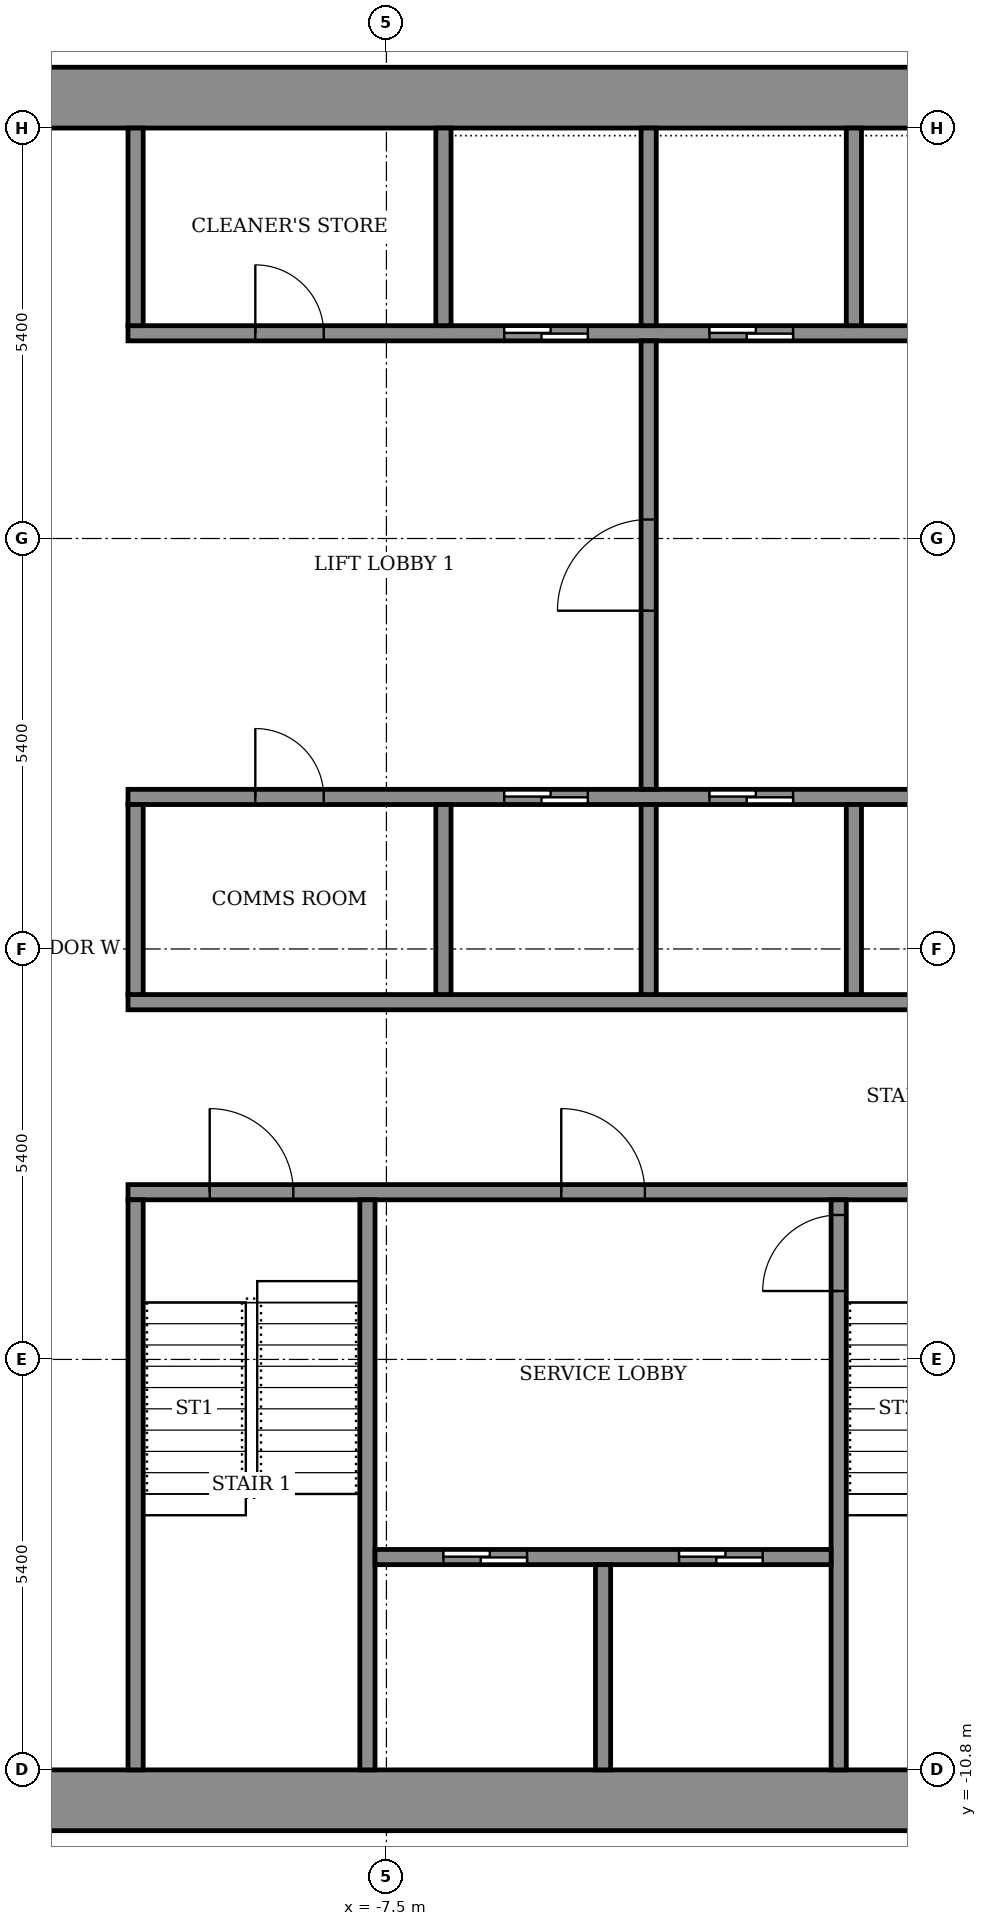
"""IFC4 building model, lengths in metres.
Left out: names, types, materials, properties, quantities, classifications, styles, units other than length and angle.
Written with IfcOpenShell. Run it as: python <this file> out.ifc"""

import sys

from ifc_helpers import new_model, si_unit, direction, frame, frame_2d, origin, place, context, subcontext, project, spatial, rectangle, extrude, element, fill, save


model = new_model("IFC4")
c1 = context("Model", 3, precision=1e-05, world=origin(), true_north=direction((0.0, 1.0)))
c2 = subcontext(c1, "Body", "Model", "MODEL_VIEW")
j1 = project(units=[si_unit("LENGTHUNIT", "METRE"), si_unit("PLANEANGLEUNIT", "RADIAN")], contexts=[c1])
p1 = place(None, origin())
s1 = spatial("IfcSite", under=j1, at=p1, CompositionType="ELEMENT")
p2 = place(p1, origin())
s2 = spatial("IfcBuilding", under=s1, at=p2, CompositionType="ELEMENT")
p3 = place(p2, frame((0.0, 0.0, 238.3)))
s3 = spatial("IfcBuildingStorey", under=s2, at=p3, CompositionType="ELEMENT", Elevation=238.3)
for number, where, z_axis, x_axis in (
    (1, (-14.6, -11.2, 0.0), (0.0, 0.0, 1.0), (1.0, 0.0, 0.0)),
    (2, (-14.6, 11.2, 0.0), (0.0, 0.0, 1.0), (1.0, 0.0, 0.0)),
):
    element("IfcWall", number, at=place(p3, frame(where, z_axis=z_axis, x_axis=x_axis)), inside=s3, PredefinedType="SHEAR", context=c2, shape_type="SweptSolid", body=[
        extrude(rectangle(XDim=29.2, YDim=0.8, at=frame_2d((14.6, 0.0))), origin(), (0.0, 0.0, 1.0), 3.6),
    ])
p4 = place(p3, frame((-10.9, -3.2, 0.0), z_axis=(0.0, 0.0, 1.0), x_axis=(1.0, 0.0, 0.0)))
e3 = element("IfcWall", 3, at=p4, inside=s3, PredefinedType="SHEAR", context=c2, shape_type="SweptSolid", body=[
    extrude(rectangle(XDim=21.8, YDim=0.2, at=frame_2d((10.9, 0.0))), origin(), (0.0, 0.0, 1.0), 3.05),
])
p5 = place(p4, frame((1.075, 0.0, 0.0)))
e4 = element("IfcOpeningElement", 4, at=p5, cuts=e3, PredefinedType="OPENING", context=c2, shape_type="SweptSolid", body=[
    extrude(rectangle(XDim=1.1, YDim=2.1, at=frame_2d((0.55, 1.05))), frame((0.0, 0.11, 0.0), z_axis=(0.0, -1.0, 0.0), x_axis=(1.0, 0.0, 0.0)), (0.0, 0.0, 1.0), 0.22),
])
p6 = place(p4, frame((10.325, 0.0, 0.0)))
e5 = element("IfcOpeningElement", 5, at=p6, cuts=e3, PredefinedType="OPENING", context=c2, shape_type="SweptSolid", body=[
    extrude(rectangle(XDim=1.1, YDim=2.1, at=frame_2d((0.55, 1.05))), frame((0.0, 0.11, 0.0), z_axis=(0.0, -1.0, 0.0), x_axis=(1.0, 0.0, 0.0)), (0.0, 0.0, 1.0), 0.22),
])
p7 = place(p4, frame((19.625, 0.0, 0.0)))
e6 = element("IfcOpeningElement", 6, at=p7, cuts=e3, PredefinedType="OPENING", context=c2, shape_type="SweptSolid", body=[
    extrude(rectangle(XDim=1.1, YDim=2.1, at=frame_2d((0.55, 1.05))), frame((0.0, 0.11, 0.0), z_axis=(0.0, -1.0, 0.0), x_axis=(1.0, 0.0, 0.0)), (0.0, 0.0, 1.0), 0.22),
])
p8 = place(p4, frame((5.7, 0.0, 0.0)))
e7 = element("IfcOpeningElement", 7, at=p8, cuts=e3, PredefinedType="OPENING", context=c2, shape_type="SweptSolid", body=[
    extrude(rectangle(XDim=1.1, YDim=2.1, at=frame_2d((0.55, 1.05))), frame((0.0, 0.11, 0.0), z_axis=(0.0, -1.0, 0.0), x_axis=(1.0, 0.0, 0.0)), (0.0, 0.0, 1.0), 0.22),
])
p9 = place(p4, frame((14.975, 0.0, 0.0)))
e8 = element("IfcOpeningElement", 8, at=p9, cuts=e3, PredefinedType="OPENING", context=c2, shape_type="SweptSolid", body=[
    extrude(rectangle(XDim=1.1, YDim=2.1, at=frame_2d((0.55, 1.05))), frame((0.0, 0.11, 0.0), z_axis=(0.0, -1.0, 0.0), x_axis=(1.0, 0.0, 0.0)), (0.0, 0.0, 1.0), 0.22),
])
p10 = place(p3, frame((-10.9, -0.7, 0.0), z_axis=(0.0, 0.0, 1.0), x_axis=(1.0, 0.0, 0.0)))
e9 = element("IfcWall", 9, at=p10, inside=s3, PredefinedType="SHEAR", context=c2, shape_type="SweptSolid", body=[
    extrude(rectangle(XDim=21.8, YDim=0.2, at=frame_2d((10.9, 0.0))), origin(), (0.0, 0.0, 1.0), 3.05),
])
p11 = place(p3, frame((-10.9, 2.0, 0.0), z_axis=(0.0, 0.0, 1.0), x_axis=(1.0, 0.0, 0.0)))
e10 = element("IfcWall", 10, at=p11, inside=s3, PredefinedType="SHEAR", context=c2, shape_type="SweptSolid", body=[
    extrude(rectangle(XDim=21.8, YDim=0.2, at=frame_2d((10.9, 0.0))), origin(), (0.0, 0.0, 1.0), 3.05),
])
p12 = place(p11, frame((4.95, 0.0, 0.0)))
e11 = element("IfcOpeningElement", 11, at=p12, cuts=e10, PredefinedType="OPENING", context=c2, shape_type="SweptSolid", body=[
    extrude(rectangle(XDim=1.1, YDim=2.1, at=frame_2d((0.55, 1.05))), frame((0.0, 0.11, 0.0), z_axis=(0.0, -1.0, 0.0), x_axis=(1.0, 0.0, 0.0)), (0.0, 0.0, 1.0), 0.22),
])
p13 = place(p11, frame((7.65, 0.0, 0.0)))
e12 = element("IfcOpeningElement", 12, at=p13, cuts=e10, PredefinedType="OPENING", context=c2, shape_type="SweptSolid", body=[
    extrude(rectangle(XDim=1.1, YDim=2.1, at=frame_2d((0.55, 1.05))), frame((0.0, 0.11, 0.0), z_axis=(0.0, -1.0, 0.0), x_axis=(1.0, 0.0, 0.0)), (0.0, 0.0, 1.0), 0.22),
])
p14 = place(p11, frame((10.35, 0.0, 0.0)))
e13 = element("IfcOpeningElement", 13, at=p14, cuts=e10, PredefinedType="OPENING", context=c2, shape_type="SweptSolid", body=[
    extrude(rectangle(XDim=1.1, YDim=2.1, at=frame_2d((0.55, 1.05))), frame((0.0, 0.11, 0.0), z_axis=(0.0, -1.0, 0.0), x_axis=(1.0, 0.0, 0.0)), (0.0, 0.0, 1.0), 0.22),
])
p15 = place(p11, frame((1.675, 0.0, 0.0)))
e14 = element("IfcOpeningElement", 14, at=p15, cuts=e10, PredefinedType="OPENING", context=c2, shape_type="SweptSolid", body=[
    extrude(rectangle(XDim=0.9, YDim=2.1, at=frame_2d((0.45, 1.05))), frame((0.0, 0.11, 0.0), z_axis=(0.0, -1.0, 0.0), x_axis=(1.0, 0.0, 0.0)), (0.0, 0.0, 1.0), 0.22),
])
p16 = place(p11, frame((13.825, 0.0, 0.0)))
e15 = element("IfcOpeningElement", 15, at=p16, cuts=e10, PredefinedType="OPENING", context=c2, shape_type="SweptSolid", body=[
    extrude(rectangle(XDim=0.9, YDim=2.1, at=frame_2d((0.45, 1.05))), frame((0.0, 0.11, 0.0), z_axis=(0.0, -1.0, 0.0), x_axis=(1.0, 0.0, 0.0)), (0.0, 0.0, 1.0), 0.22),
])
p17 = place(p11, frame((18.55, 0.0, 0.0)))
e16 = element("IfcOpeningElement", 16, at=p17, cuts=e10, PredefinedType="OPENING", context=c2, shape_type="SweptSolid", body=[
    extrude(rectangle(XDim=0.9, YDim=2.1, at=frame_2d((0.45, 1.05))), frame((0.0, 0.11, 0.0), z_axis=(0.0, -1.0, 0.0), x_axis=(1.0, 0.0, 0.0)), (0.0, 0.0, 1.0), 0.22),
])
p18 = place(p3, frame((-10.9, 8.1, 0.0), z_axis=(0.0, 0.0, 1.0), x_axis=(1.0, 0.0, 0.0)))
e17 = element("IfcWall", 17, at=p18, inside=s3, PredefinedType="SHEAR", context=c2, shape_type="SweptSolid", body=[
    extrude(rectangle(XDim=21.8, YDim=0.2, at=frame_2d((10.9, 0.0))), origin(), (0.0, 0.0, 1.0), 3.05),
])
p19 = place(p18, frame((4.95, 0.0, 0.0)))
e18 = element("IfcOpeningElement", 18, at=p19, cuts=e17, PredefinedType="OPENING", context=c2, shape_type="SweptSolid", body=[
    extrude(rectangle(XDim=1.1, YDim=2.1, at=frame_2d((0.55, 1.05))), frame((0.0, 0.11, 0.0), z_axis=(0.0, -1.0, 0.0), x_axis=(1.0, 0.0, 0.0)), (0.0, 0.0, 1.0), 0.22),
])
p20 = place(p18, frame((7.65, 0.0, 0.0)))
e19 = element("IfcOpeningElement", 19, at=p20, cuts=e17, PredefinedType="OPENING", context=c2, shape_type="SweptSolid", body=[
    extrude(rectangle(XDim=1.1, YDim=2.1, at=frame_2d((0.55, 1.05))), frame((0.0, 0.11, 0.0), z_axis=(0.0, -1.0, 0.0), x_axis=(1.0, 0.0, 0.0)), (0.0, 0.0, 1.0), 0.22),
])
p21 = place(p18, frame((10.35, 0.0, 0.0)))
e20 = element("IfcOpeningElement", 20, at=p21, cuts=e17, PredefinedType="OPENING", context=c2, shape_type="SweptSolid", body=[
    extrude(rectangle(XDim=1.1, YDim=2.1, at=frame_2d((0.55, 1.05))), frame((0.0, 0.11, 0.0), z_axis=(0.0, -1.0, 0.0), x_axis=(1.0, 0.0, 0.0)), (0.0, 0.0, 1.0), 0.22),
])
p22 = place(p18, frame((1.675, 0.0, 0.0)))
e21 = element("IfcOpeningElement", 21, at=p22, cuts=e17, PredefinedType="OPENING", context=c2, shape_type="SweptSolid", body=[
    extrude(rectangle(XDim=0.9, YDim=2.1, at=frame_2d((0.45, 1.05))), frame((0.0, 0.11, 0.0), z_axis=(0.0, -1.0, 0.0), x_axis=(1.0, 0.0, 0.0)), (0.0, 0.0, 1.0), 0.22),
])
p23 = place(p18, frame((13.825, 0.0, 0.0)))
e22 = element("IfcOpeningElement", 22, at=p23, cuts=e17, PredefinedType="OPENING", context=c2, shape_type="SweptSolid", body=[
    extrude(rectangle(XDim=0.9, YDim=2.1, at=frame_2d((0.45, 1.05))), frame((0.0, 0.11, 0.0), z_axis=(0.0, -1.0, 0.0), x_axis=(1.0, 0.0, 0.0)), (0.0, 0.0, 1.0), 0.22),
])
p24 = place(p18, frame((18.55, 0.0, 0.0)))
e23 = element("IfcOpeningElement", 23, at=p24, cuts=e17, PredefinedType="OPENING", context=c2, shape_type="SweptSolid", body=[
    extrude(rectangle(XDim=0.9, YDim=2.1, at=frame_2d((0.45, 1.05))), frame((0.0, 0.11, 0.0), z_axis=(0.0, -1.0, 0.0), x_axis=(1.0, 0.0, 0.0)), (0.0, 0.0, 1.0), 0.22),
])
for number, where, z_axis, x_axis in (
    (24, (-10.8, -10.8, 0.0), (0.0, 0.0, 1.0), (0.0, 1.0, 0.0)),
    (25, (-7.75, -10.8, 0.0), (0.0, 0.0, 1.0), (0.0, 1.0, 0.0)),
):
    element("IfcWall", number, at=place(p3, frame(where, z_axis=z_axis, x_axis=x_axis)), inside=s3, PredefinedType="SHEAR", context=c2, shape_type="SweptSolid", body=[
        extrude(rectangle(XDim=7.5, YDim=0.2, at=frame_2d((3.75, 0.0))), origin(), (0.0, 0.0, 1.0), 3.05),
    ])
p25 = place(p3, frame((-1.55, -10.8, 0.0), z_axis=(0.0, 0.0, 1.0), x_axis=(0.0, 1.0, 0.0)))
e26 = element("IfcWall", 26, at=p25, inside=s3, PredefinedType="SHEAR", context=c2, shape_type="SweptSolid", body=[
    extrude(rectangle(XDim=7.5, YDim=0.2, at=frame_2d((3.75, 0.0))), origin(), (0.0, 0.0, 1.0), 3.05),
])
p26 = place(p25, frame((6.3, 0.0, 0.0)))
e27 = element("IfcOpeningElement", 27, at=p26, cuts=e26, PredefinedType="OPENING", context=c2, shape_type="SweptSolid", body=[
    extrude(rectangle(XDim=1.0, YDim=2.1, at=frame_2d((0.5, 1.05))), frame((0.0, 0.11, 0.0), z_axis=(0.0, -1.0, 0.0), x_axis=(1.0, 0.0, 0.0)), (0.0, 0.0, 1.0), 0.22),
])
p27 = place(p3, frame((-7.65, -8.0, 0.0), z_axis=(0.0, 0.0, 1.0), x_axis=(1.0, 0.0, 0.0)))
e28 = element("IfcWall", 28, at=p27, inside=s3, PredefinedType="SHEAR", context=c2, shape_type="SweptSolid", body=[
    extrude(rectangle(XDim=6.0, YDim=0.2, at=frame_2d((3.0, 0.0))), origin(), (0.0, 0.0, 1.0), 3.05),
])
p28 = place(p27, frame((0.9, 0.0, 0.0)))
e29 = element("IfcOpeningElement", 29, at=p28, cuts=e28, PredefinedType="OPENING", context=c2, shape_type="SweptSolid", body=[
    extrude(rectangle(XDim=1.1, YDim=2.1, at=frame_2d((0.55, 1.05))), frame((0.0, 0.11, 0.0), z_axis=(0.0, -1.0, 0.0), x_axis=(1.0, 0.0, 0.0)), (0.0, 0.0, 1.0), 0.22),
])
p29 = place(p27, frame((4.0, 0.0, 0.0)))
e30 = element("IfcOpeningElement", 30, at=p29, cuts=e28, PredefinedType="OPENING", context=c2, shape_type="SweptSolid", body=[
    extrude(rectangle(XDim=1.1, YDim=2.1, at=frame_2d((0.55, 1.05))), frame((0.0, 0.11, 0.0), z_axis=(0.0, -1.0, 0.0), x_axis=(1.0, 0.0, 0.0)), (0.0, 0.0, 1.0), 0.22),
])
p30 = place(p3, frame((-4.65, -10.8, 0.0), z_axis=(0.0, 0.0, 1.0), x_axis=(0.0, 1.0, 0.0)))
e31 = element("IfcWall", 31, at=p30, inside=s3, PredefinedType="SHEAR", context=c2, shape_type="SweptSolid", body=[
    extrude(rectangle(XDim=2.7, YDim=0.2, at=frame_2d((1.35, 0.0))), origin(), (0.0, 0.0, 1.0), 3.05),
])
p31 = place(p3, frame((-10.8, -0.6, 0.0), z_axis=(0.0, 0.0, 1.0), x_axis=(0.0, 1.0, 0.0)))
e32 = element("IfcWall", 32, at=p31, inside=s3, PredefinedType="STANDARD", context=c2, shape_type="SweptSolid", body=[
    extrude(rectangle(XDim=2.5, YDim=0.2, at=frame_2d((1.25, 0.0))), origin(), (0.0, 0.0, 1.0), 3.05),
])
for number, where, z_axis, x_axis in (
    (33, (-6.75, -0.6, 0.0), (0.0, 0.0, 1.0), (0.0, 1.0, 0.0)),
    (34, (-4.05, -0.6, 0.0), (0.0, 0.0, 1.0), (0.0, 1.0, 0.0)),
    (35, (-1.35, -0.6, 0.0), (0.0, 0.0, 1.0), (0.0, 1.0, 0.0)),
):
    element("IfcWall", number, at=place(p3, frame(where, z_axis=z_axis, x_axis=x_axis)), inside=s3, PredefinedType="SHEAR", context=c2, shape_type="SweptSolid", body=[
        extrude(rectangle(XDim=2.5, YDim=0.2, at=frame_2d((1.25, 0.0))), origin(), (0.0, 0.0, 1.0), 3.05),
    ])
p32 = place(p3, frame((-10.8, 8.2, 0.0), z_axis=(0.0, 0.0, 1.0), x_axis=(0.0, 1.0, 0.0)))
e36 = element("IfcWall", 36, at=p32, inside=s3, PredefinedType="STANDARD", context=c2, shape_type="SweptSolid", body=[
    extrude(rectangle(XDim=2.6, YDim=0.2, at=frame_2d((1.3, 0.0))), origin(), (0.0, 0.0, 1.0), 3.05),
])
for number, where, z_axis, x_axis in (
    (37, (-6.75, 8.2, 0.0), (0.0, 0.0, 1.0), (0.0, 1.0, 0.0)),
    (38, (-4.05, 8.2, 0.0), (0.0, 0.0, 1.0), (0.0, 1.0, 0.0)),
    (39, (-1.35, 8.2, 0.0), (0.0, 0.0, 1.0), (0.0, 1.0, 0.0)),
):
    element("IfcWall", number, at=place(p3, frame(where, z_axis=z_axis, x_axis=x_axis)), inside=s3, PredefinedType="SHEAR", context=c2, shape_type="SweptSolid", body=[
        extrude(rectangle(XDim=2.6, YDim=0.2, at=frame_2d((1.3, 0.0))), origin(), (0.0, 0.0, 1.0), 3.05),
    ])
p33 = place(p3, frame((-4.05, 2.1, 0.0), z_axis=(0.0, 0.0, 1.0), x_axis=(0.0, 1.0, 0.0)))
e40 = element("IfcWall", 40, at=p33, inside=s3, PredefinedType="STANDARD", context=c2, shape_type="SweptSolid", body=[
    extrude(rectangle(XDim=5.9, YDim=0.2, at=frame_2d((2.95, 0.0))), origin(), (0.0, 0.0, 1.0), 3.05),
])
p34 = place(p33, frame((2.35, 0.0, 0.0)))
e41 = element("IfcOpeningElement", 41, at=p34, cuts=e40, PredefinedType="OPENING", context=c2, shape_type="SweptSolid", body=[
    extrude(rectangle(XDim=1.2, YDim=2.1, at=frame_2d((0.6, 1.05))), frame((0.0, 0.11, 0.0), z_axis=(0.0, -1.0, 0.0), x_axis=(1.0, 0.0, 0.0)), (0.0, 0.0, 1.0), 0.22),
])
p35 = place(p12, origin())
e42 = element("IfcDoor", 42, at=p35, inside=s3, OperationType="SLIDING_TO_LEFT", PredefinedType="DOOR", context=c2, shape_type="SweptSolid", body=[
    extrude(rectangle(XDim=1.1, YDim=2.1, at=frame_2d((0.55, 1.05))), frame((0.0, 0.025, 0.0), z_axis=(0.0, -1.0, 0.0), x_axis=(1.0, 0.0, 0.0)), (0.0, 0.0, 1.0), 0.05),
])
fill(e11, e42)
p36 = place(p13, origin())
e43 = element("IfcDoor", 43, at=p36, inside=s3, OperationType="SLIDING_TO_LEFT", PredefinedType="DOOR", context=c2, shape_type="SweptSolid", body=[
    extrude(rectangle(XDim=1.1, YDim=2.1, at=frame_2d((0.55, 1.05))), frame((0.0, 0.025, 0.0), z_axis=(0.0, -1.0, 0.0), x_axis=(1.0, 0.0, 0.0)), (0.0, 0.0, 1.0), 0.05),
])
fill(e12, e43)
p37 = place(p19, origin())
e44 = element("IfcDoor", 44, at=p37, inside=s3, OperationType="SLIDING_TO_LEFT", PredefinedType="DOOR", context=c2, shape_type="SweptSolid", body=[
    extrude(rectangle(XDim=1.1, YDim=2.1, at=frame_2d((0.55, 1.05))), frame((0.0, 0.025, 0.0), z_axis=(0.0, -1.0, 0.0), x_axis=(1.0, 0.0, 0.0)), (0.0, 0.0, 1.0), 0.05),
])
fill(e18, e44)
p38 = place(p20, origin())
e45 = element("IfcDoor", 45, at=p38, inside=s3, OperationType="SLIDING_TO_LEFT", PredefinedType="DOOR", context=c2, shape_type="SweptSolid", body=[
    extrude(rectangle(XDim=1.1, YDim=2.1, at=frame_2d((0.55, 1.05))), frame((0.0, 0.025, 0.0), z_axis=(0.0, -1.0, 0.0), x_axis=(1.0, 0.0, 0.0)), (0.0, 0.0, 1.0), 0.05),
])
fill(e19, e45)
p39 = place(p15, origin())
e46 = element("IfcDoor", 46, at=p39, inside=s3, OperationType="SINGLE_SWING_LEFT", PredefinedType="DOOR", context=c2, shape_type="SweptSolid", body=[
    extrude(rectangle(XDim=0.9, YDim=2.1, at=frame_2d((0.45, 1.05))), frame((0.0, 0.025, 0.0), z_axis=(0.0, -1.0, 0.0), x_axis=(1.0, 0.0, 0.0)), (0.0, 0.0, 1.0), 0.05),
])
fill(e14, e46)
p40 = place(p22, origin())
e47 = element("IfcDoor", 47, at=p40, inside=s3, OperationType="SINGLE_SWING_RIGHT", PredefinedType="DOOR", context=c2, shape_type="SweptSolid", body=[
    extrude(rectangle(XDim=0.9, YDim=2.1, at=frame_2d((0.45, 1.05))), frame((0.0, 0.025, 0.0), z_axis=(0.0, -1.0, 0.0), x_axis=(1.0, 0.0, 0.0)), (0.0, 0.0, 1.0), 0.05),
])
fill(e21, e47)
p41 = place(p28, origin())
e48 = element("IfcDoor", 48, at=p41, inside=s3, OperationType="SLIDING_TO_LEFT", PredefinedType="DOOR", context=c2, shape_type="SweptSolid", body=[
    extrude(rectangle(XDim=1.1, YDim=2.1, at=frame_2d((0.55, 1.05))), frame((0.0, 0.025, 0.0), z_axis=(0.0, -1.0, 0.0), x_axis=(1.0, 0.0, 0.0)), (0.0, 0.0, 1.0), 0.05),
])
fill(e29, e48)
p42 = place(p29, origin())
e49 = element("IfcDoor", 49, at=p42, inside=s3, OperationType="SLIDING_TO_LEFT", PredefinedType="DOOR", context=c2, shape_type="SweptSolid", body=[
    extrude(rectangle(XDim=1.1, YDim=2.1, at=frame_2d((0.55, 1.05))), frame((0.0, 0.025, 0.0), z_axis=(0.0, -1.0, 0.0), x_axis=(1.0, 0.0, 0.0)), (0.0, 0.0, 1.0), 0.05),
])
fill(e30, e49)
p43 = place(p5, origin())
e50 = element("IfcDoor", 50, at=p43, inside=s3, OperationType="SINGLE_SWING_RIGHT", PredefinedType="DOOR", context=c2, shape_type="SweptSolid", body=[
    extrude(rectangle(XDim=1.1, YDim=2.1, at=frame_2d((0.55, 1.05))), frame((0.0, 0.025, 0.0), z_axis=(0.0, -1.0, 0.0), x_axis=(1.0, 0.0, 0.0)), (0.0, 0.0, 1.0), 0.05),
])
fill(e4, e50)
p44 = place(p8, origin())
e51 = element("IfcDoor", 51, at=p44, inside=s3, OperationType="SINGLE_SWING_LEFT", PredefinedType="DOOR", context=c2, shape_type="SweptSolid", body=[
    extrude(rectangle(XDim=1.1, YDim=2.1, at=frame_2d((0.55, 1.05))), frame((0.0, 0.025, 0.0), z_axis=(0.0, -1.0, 0.0), x_axis=(1.0, 0.0, 0.0)), (0.0, 0.0, 1.0), 0.05),
])
fill(e7, e51)
p45 = place(p26, origin())
e52 = element("IfcDoor", 52, at=p45, inside=s3, OperationType="SINGLE_SWING_RIGHT", PredefinedType="DOOR", context=c2, shape_type="SweptSolid", body=[
    extrude(rectangle(XDim=1.0, YDim=2.1, at=frame_2d((0.5, 1.05))), frame((0.0, 0.025, 0.0), z_axis=(0.0, -1.0, 0.0), x_axis=(1.0, 0.0, 0.0)), (0.0, 0.0, 1.0), 0.05),
])
fill(e27, e52)
p46 = place(p34, origin())
e53 = element("IfcDoor", 53, at=p46, inside=s3, OperationType="SINGLE_SWING_LEFT", PredefinedType="DOOR", context=c2, shape_type="SweptSolid", body=[
    extrude(rectangle(XDim=1.2, YDim=2.1, at=frame_2d((0.6, 1.05))), frame((0.0, 0.025, 0.0), z_axis=(0.0, -1.0, 0.0), x_axis=(1.0, 0.0, 0.0)), (0.0, 0.0, 1.0), 0.05),
])
fill(e41, e53)
save(model, sys.argv[1])
